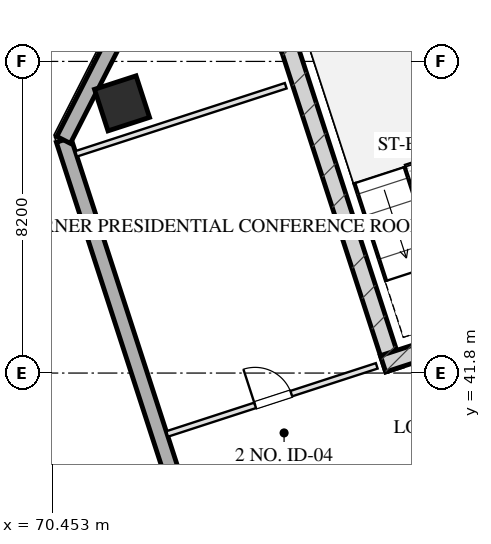
"""IFC4 building model, lengths in metres.
Left out: names, types, materials, properties, quantities, classifications, styles, units other than length and angle.
Written with IfcOpenShell. Run it as: python <this file> out.ifc"""

import sys

from ifc_helpers import new_model, si_unit, direction, frame, frame_2d, origin, origin_2d, place, context, subcontext, project, spatial, rectangle, hollow_rectangle, extrude, element, fill, save


model = new_model("IFC4")
c1 = context("Model", 3, precision=1e-05, world=origin(), true_north=direction((0.0, 1.0)))
c2 = subcontext(c1, "Body", "Model", "MODEL_VIEW")
j1 = project(units=[si_unit("LENGTHUNIT", "METRE"), si_unit("PLANEANGLEUNIT", "RADIAN")], contexts=[c1])
p1 = place(None, origin())
s1 = spatial("IfcSite", under=j1, at=p1, CompositionType="ELEMENT")
p2 = place(p1, origin())
s2 = spatial("IfcBuilding", under=s1, at=p2, CompositionType="ELEMENT")
p3 = place(p2, frame((0.0, 0.0, 240.8)))
s3 = spatial("IfcBuildingStorey", under=s2, at=p3, CompositionType="ELEMENT", Elevation=240.8)
p4 = place(p3, frame((79.442, 41.899, 0.0), z_axis=(0.0, 0.0, 1.0), x_axis=(-0.309035778627, 0.951050412717, 0.0)))
e1 = element("IfcWall", 1, at=p4, inside=s3, PredefinedType="SHEAR", context=c2, shape_type="SweptSolid", body=[
    extrude(rectangle(XDim=9.33, YDim=0.45, at=frame_2d((4.665, 0.0))), origin(), (0.0, 0.0, 1.0), 3.2),
])
p5 = place(p3, frame((79.159, 42.043, 0.0), z_axis=(0.0, 0.0, 1.0), x_axis=(0.951047485828, 0.309044785913, 0.0)))
e2 = element("IfcWall", 2, at=p5, inside=s3, PredefinedType="SHEAR", context=c2, shape_type="SweptSolid", body=[
    extrude(rectangle(XDim=4.145, YDim=0.45, at=frame_2d((2.073, 0.0))), origin(), (0.0, 0.0, 1.0), 3.2),
])
p6 = place(p3, frame((72.29, 48.896, 0.0), z_axis=(0.0, 0.0, 1.0), x_axis=(0.951056516295, 0.309016994375, 0.0)))
e3 = element("IfcColumn", 3, at=p6, inside=s3, PredefinedType="COLUMN", context=c2, shape_type="SweptSolid", body=[
    extrude(hollow_rectangle(XDim=1.15, YDim=1.15, WallThickness=0.04, at=origin_2d()), origin(), (0.0, 0.0, 1.0), 3.201),
])
p7 = place(p3, frame((82.618, 11.414, 0.0), z_axis=(0.0, 0.0, 1.0), x_axis=(-0.309016491071, 0.951056679828, 0.0)))
e4 = element("IfcWall", 4, at=p7, inside=s3, PredefinedType="SOLIDWALL", context=c2, shape_type="SweptSolid", body=[
    extrude(rectangle(XDim=38.4, YDim=0.4, at=frame_2d((19.2, 0.0))), origin(), (0.0, 0.0, 1.0), 2.36),
])
p8 = place(p7, frame((11.825, 0.0, 0.75)))
e5 = element("IfcOpeningElement", 5, at=p8, cuts=e4, PredefinedType="OPENING", context=c2, shape_type="SweptSolid", body=[
    extrude(rectangle(XDim=1.95, YDim=1.21, at=frame_2d((0.975, 0.605))), frame((0.0, 0.21, 0.0), z_axis=(0.0, -1.0, 0.0), x_axis=(1.0, 0.0, 0.0)), (0.0, 0.0, 1.0), 0.42),
])
p9 = place(p7, frame((15.625, 0.0, 0.75)))
e6 = element("IfcOpeningElement", 6, at=p9, cuts=e4, PredefinedType="OPENING", context=c2, shape_type="SweptSolid", body=[
    extrude(rectangle(XDim=1.95, YDim=1.21, at=frame_2d((0.975, 0.605))), frame((0.0, 0.21, 0.0), z_axis=(0.0, -1.0, 0.0), x_axis=(1.0, 0.0, 0.0)), (0.0, 0.0, 1.0), 0.42),
])
p10 = place(p7, frame((21.5, 0.0, 0.0)))
e7 = element("IfcOpeningElement", 7, at=p10, cuts=e4, PredefinedType="OPENING", context=c2, shape_type="SweptSolid", body=[
    extrude(rectangle(XDim=1.1, YDim=2.15, at=frame_2d((0.55, 1.075))), frame((0.0, 0.21, 0.0), z_axis=(0.0, -1.0, 0.0), x_axis=(1.0, 0.0, 0.0)), (0.0, 0.0, 1.0), 0.42),
])
p11 = place(p3, frame((70.752, 47.934, 0.0), z_axis=(0.0, 0.0, 1.0), x_axis=(0.453949291228, 0.891027519774, 0.0)))
e8 = element("IfcWall", 8, at=p11, inside=s3, PredefinedType="SOLIDWALL", context=c2, shape_type="SweptSolid", body=[
    extrude(rectangle(XDim=3.111, YDim=0.4, at=frame_2d((1.556, 0.0))), origin(), (0.0, 0.0, 1.0), 2.36),
])
p12 = place(p3, frame((71.081, 47.568, 0.0), z_axis=(0.0, 0.0, 1.0), x_axis=(0.951059431056, 0.309008023519, 0.0)))
e9 = element("IfcWall", 9, at=p12, inside=s3, PredefinedType="PARTITIONING", context=c2, shape_type="SweptSolid", body=[
    extrude(rectangle(XDim=5.8, YDim=0.15, at=frame_2d((2.9, 0.0))), origin(), (0.0, 0.0, 1.0), 2.925),
])
p13 = place(p3, frame((73.476, 40.197, 0.0), z_axis=(0.0, 0.0, 1.0), x_axis=(0.951059431056, 0.309008023519, 0.0)))
e10 = element("IfcWall", 10, at=p13, inside=s3, PredefinedType="PARTITIONING", context=c2, shape_type="SweptSolid", body=[
    extrude(rectangle(XDim=5.8, YDim=0.15, at=frame_2d((2.9, 0.0))), origin(), (0.0, 0.0, 1.0), 2.925),
])
p14 = place(p13, frame((2.436, 0.0, 0.0)))
e11 = element("IfcOpeningElement", 11, at=p14, cuts=e10, PredefinedType="OPENING", context=c2, shape_type="SweptSolid", body=[
    extrude(rectangle(XDim=1.0, YDim=2.05, at=frame_2d((0.5, 1.025))), frame((0.0, 0.085, 0.0), z_axis=(0.0, -1.0, 0.0), x_axis=(1.0, 0.0, 0.0)), (0.0, 0.0, 1.0), 0.17),
])
p15 = place(p14, origin())
e12 = element("IfcDoor", 12, at=p15, inside=s3, OperationType="SINGLE_SWING_LEFT", PredefinedType="DOOR", context=c2, shape_type="SweptSolid", body=[
    extrude(rectangle(XDim=1.0, YDim=2.05, at=frame_2d((0.5, 1.025))), frame((0.0, 0.025, 0.0), z_axis=(0.0, -1.0, 0.0), x_axis=(1.0, 0.0, 0.0)), (0.0, 0.0, 1.0), 0.05),
])
fill(e11, e12)
save(model, sys.argv[1])
